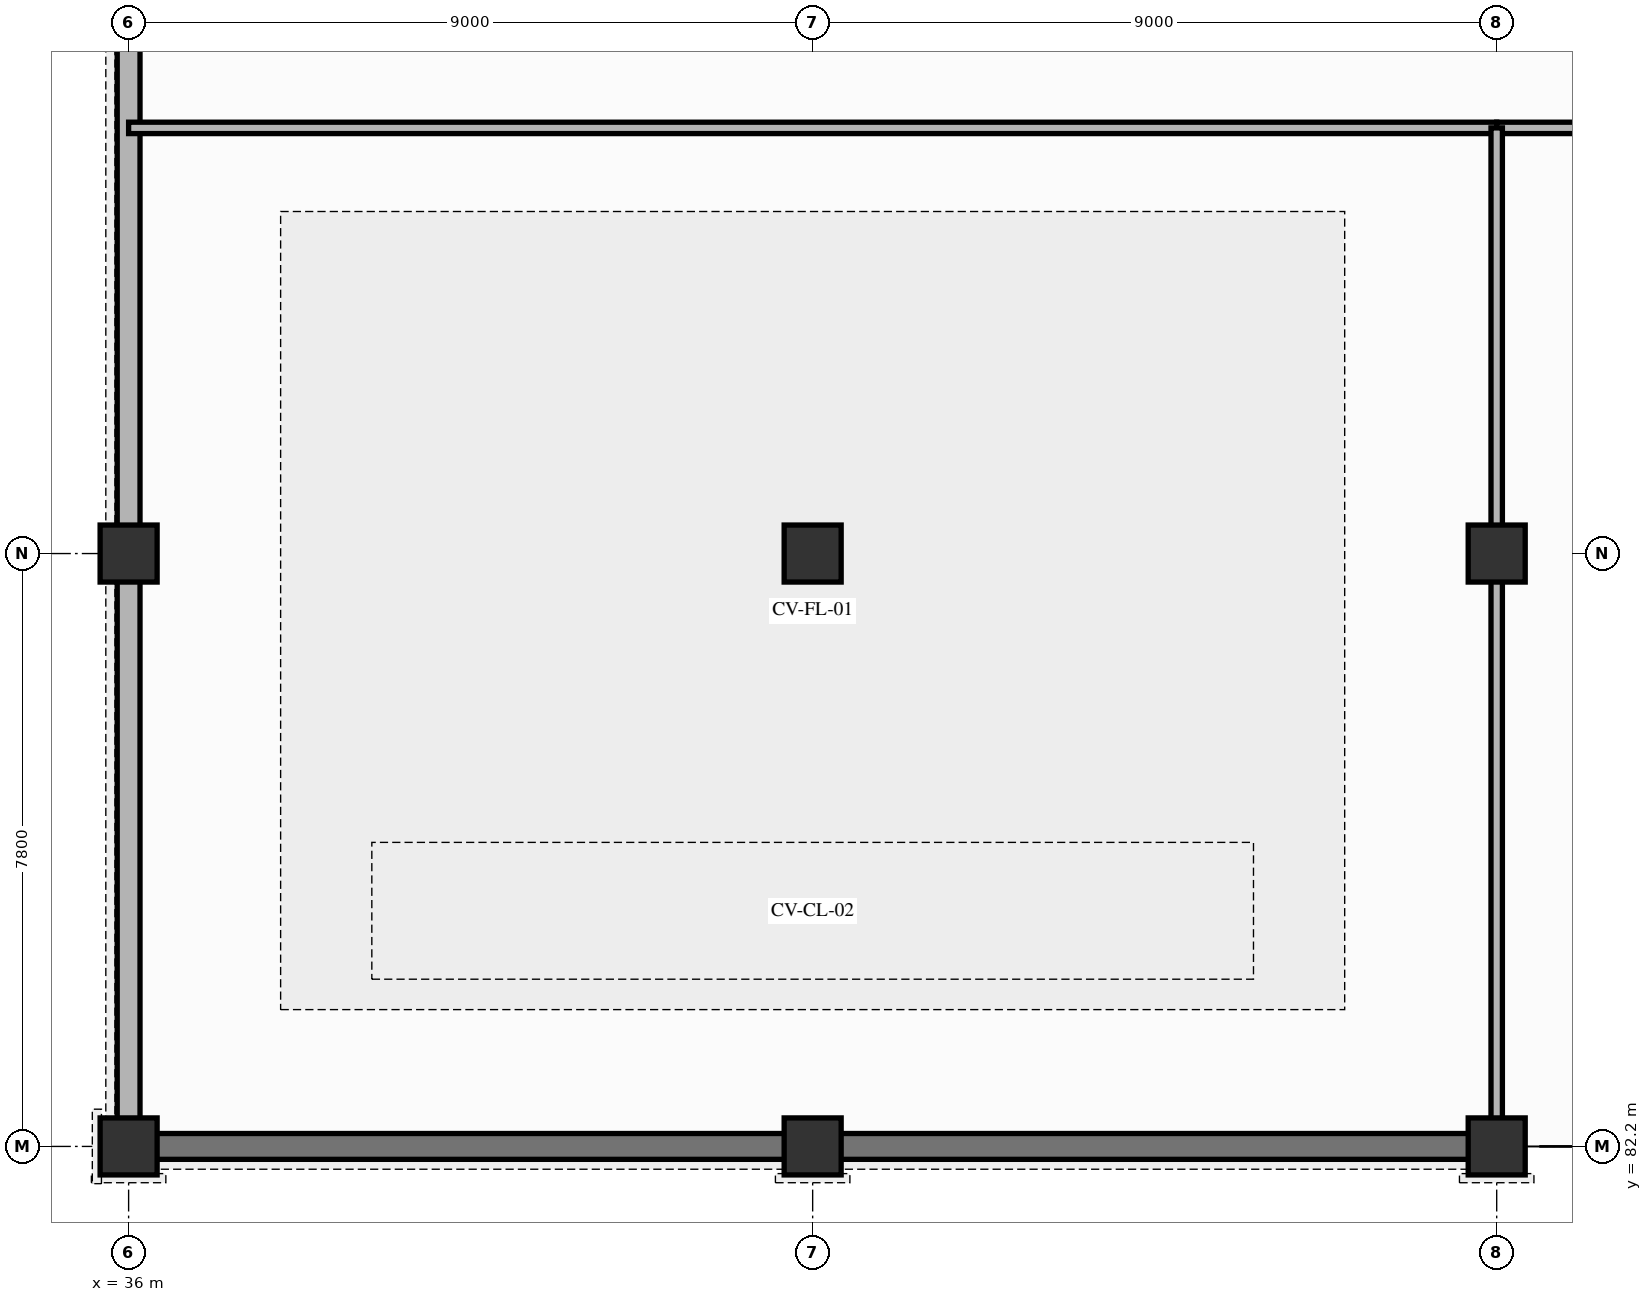
"""IFC4 building model, lengths in metres.
Left out: names, types, materials, properties, quantities, classifications, styles, units other than length and angle.
Written with IfcOpenShell. Run it as: python <this file> out.ifc"""

import sys

from ifc_helpers import new_model, si_unit, direction, frame, frame_2d, origin, origin_2d, place, context, subcontext, project, spatial, rectangle, extrude, element, fill, save


model = new_model("IFC4")
c1 = context("Model", 3, precision=1e-05, world=origin(), true_north=direction((0.0, 1.0)))
c2 = subcontext(c1, "Body", "Model", "MODEL_VIEW")
j1 = project(units=[si_unit("LENGTHUNIT", "METRE"), si_unit("PLANEANGLEUNIT", "RADIAN")], contexts=[c1])
p1 = place(None, origin())
s1 = spatial("IfcSite", under=j1, at=p1, CompositionType="ELEMENT")
p2 = place(p1, origin())
s2 = spatial("IfcBuilding", under=s1, at=p2, CompositionType="ELEMENT")
p3 = place(p2, frame((0.0, 0.0, 8.94)))
s3 = spatial("IfcBuildingStorey", under=s2, at=p3, CompositionType="ELEMENT", Elevation=8.94)
for number, where, z_axis, x_axis in (
    (1, (36.0, 82.2, 0.0), (0.0, 0.0, 1.0), (1.0, 0.0, 0.0)),
    (2, (36.0, 90.0, 0.0), (0.0, 0.0, 1.0), (1.0, 0.0, 0.0)),
    (3, (45.0, 82.2, 0.0), (0.0, 0.0, 1.0), (1.0, 0.0, 0.0)),
    (4, (45.0, 90.0, 0.0), (0.0, 0.0, 1.0), (1.0, 0.0, 0.0)),
    (5, (54.0, 82.2, 0.0), (0.0, 0.0, 1.0), (1.0, 0.0, 0.0)),
    (6, (54.0, 90.0, 0.0), (0.0, 0.0, 1.0), (1.0, 0.0, 0.0)),
):
    element("IfcColumn", number, at=place(p3, frame(where, z_axis=z_axis, x_axis=x_axis)), inside=s3, PredefinedType="COLUMN", context=c2, shape_type="SweptSolid", body=[
        extrude(rectangle(XDim=0.75, YDim=0.75, at=origin_2d()), origin(), (0.0, 0.0, 1.0), 3.84),
    ])
p4 = place(p3, frame((36.0, 82.2, 0.0), z_axis=(0.0, 0.0, 1.0), x_axis=(1.0, 0.0, 0.0)))
e7 = element("IfcWall", 7, at=p4, inside=s3, PredefinedType="SOLIDWALL", context=c2, shape_type="SweptSolid", body=[
    extrude(rectangle(XDim=9.0, YDim=0.34, at=frame_2d((4.5, 0.0))), origin(), (0.0, 0.0, 1.0), 3.53),
])
p5 = place(p4, frame((1.8, 0.0, 0.665)))
e8 = element("IfcOpeningElement", 8, at=p5, cuts=e7, PredefinedType="OPENING", context=c2, shape_type="SweptSolid", body=[
    extrude(rectangle(XDim=1.5, YDim=2.1, at=frame_2d((0.75, 1.05))), frame((0.0, 0.18, 0.0), z_axis=(0.0, -1.0, 0.0), x_axis=(1.0, 0.0, 0.0)), (0.0, 0.0, 1.0), 0.36),
])
p6 = place(p4, frame((5.4, 0.0, 0.665)))
e9 = element("IfcOpeningElement", 9, at=p6, cuts=e7, PredefinedType="OPENING", context=c2, shape_type="SweptSolid", body=[
    extrude(rectangle(XDim=1.2, YDim=2.1, at=frame_2d((0.6, 1.05))), frame((0.0, 0.18, 0.0), z_axis=(0.0, -1.0, 0.0), x_axis=(1.0, 0.0, 0.0)), (0.0, 0.0, 1.0), 0.36),
])
p7 = place(p3, frame((45.0, 82.2, 0.0), z_axis=(0.0, 0.0, 1.0), x_axis=(1.0, 0.0, 0.0)))
e10 = element("IfcWall", 10, at=p7, inside=s3, PredefinedType="SOLIDWALL", context=c2, shape_type="SweptSolid", body=[
    extrude(rectangle(XDim=9.0, YDim=0.34, at=frame_2d((4.5, 0.0))), origin(), (0.0, 0.0, 1.0), 3.53),
])
p8 = place(p7, frame((1.8, 0.0, 0.665)))
e11 = element("IfcOpeningElement", 11, at=p8, cuts=e10, PredefinedType="OPENING", context=c2, shape_type="SweptSolid", body=[
    extrude(rectangle(XDim=1.5, YDim=2.1, at=frame_2d((0.75, 1.05))), frame((0.0, 0.18, 0.0), z_axis=(0.0, -1.0, 0.0), x_axis=(1.0, 0.0, 0.0)), (0.0, 0.0, 1.0), 0.36),
])
p9 = place(p7, frame((5.4, 0.0, 0.665)))
e12 = element("IfcOpeningElement", 12, at=p9, cuts=e10, PredefinedType="OPENING", context=c2, shape_type="SweptSolid", body=[
    extrude(rectangle(XDim=1.2, YDim=2.1, at=frame_2d((0.6, 1.05))), frame((0.0, 0.18, 0.0), z_axis=(0.0, -1.0, 0.0), x_axis=(1.0, 0.0, 0.0)), (0.0, 0.0, 1.0), 0.36),
])
p10 = place(p3, frame((36.0, 82.2, 0.0), z_axis=(0.0, 0.0, 1.0), x_axis=(0.0, 1.0, 0.0)))
e13 = element("IfcWall", 13, at=p10, inside=s3, PredefinedType="SOLIDWALL", context=c2, shape_type="SweptSolid", body=[
    extrude(rectangle(XDim=31.8, YDim=0.3, at=frame_2d((15.9, 0.0))), origin(), (0.0, 0.0, 1.0), 2.805),
])
p11 = place(p10, frame((3.0, 0.0, 0.835)))
e14 = element("IfcOpeningElement", 14, at=p11, cuts=e13, PredefinedType="OPENING", context=c2, shape_type="SweptSolid", body=[
    extrude(rectangle(XDim=1.35, YDim=1.85, at=frame_2d((0.675, 0.925))), frame((0.0, 0.16, 0.0), z_axis=(0.0, -1.0, 0.0), x_axis=(1.0, 0.0, 0.0)), (0.0, 0.0, 1.0), 0.32),
])
p12 = place(p10, frame((9.5, 0.0, 0.935)))
e15 = element("IfcOpeningElement", 15, at=p12, cuts=e13, PredefinedType="OPENING", context=c2, shape_type="SweptSolid", body=[
    extrude(rectangle(XDim=1.05, YDim=1.75, at=frame_2d((0.525, 0.875))), frame((0.0, 0.16, 0.0), z_axis=(0.0, -1.0, 0.0), x_axis=(1.0, 0.0, 0.0)), (0.0, 0.0, 1.0), 0.32),
])
p13 = place(p10, frame((16.5, 0.0, 0.585)))
e16 = element("IfcOpeningElement", 16, at=p13, cuts=e13, PredefinedType="OPENING", context=c2, shape_type="SweptSolid", body=[
    extrude(rectangle(XDim=1.5, YDim=2.1, at=frame_2d((0.75, 1.05))), frame((0.0, 0.16, 0.0), z_axis=(0.0, -1.0, 0.0), x_axis=(1.0, 0.0, 0.0)), (0.0, 0.0, 1.0), 0.32),
])
p14 = place(p3, frame((36.0, 95.6, 0.0), z_axis=(0.0, 0.0, 1.0), x_axis=(1.0, 0.0, 0.0)))
e17 = element("IfcWall", 17, at=p14, inside=s3, PredefinedType="PARTITIONING", context=c2, shape_type="SweptSolid", body=[
    extrude(rectangle(XDim=18.0, YDim=0.15, at=frame_2d((9.0, 0.0))), origin(), (0.0, 0.0, 1.0), 2.705),
])
p15 = place(p14, frame((8.5, 0.0, 0.0)))
e18 = element("IfcOpeningElement", 18, at=p15, cuts=e17, PredefinedType="OPENING", context=c2, shape_type="SweptSolid", body=[
    extrude(rectangle(XDim=1.6, YDim=2.2, at=frame_2d((0.8, 1.1))), frame((0.0, 0.085, 0.0), z_axis=(0.0, -1.0, 0.0), x_axis=(1.0, 0.0, 0.0)), (0.0, 0.0, 1.0), 0.17),
])
p16 = place(p3, frame((54.0, 95.6, 0.0), z_axis=(0.0, 0.0, 1.0), x_axis=(1.0, 0.0, 0.0)))
e19 = element("IfcWall", 19, at=p16, inside=s3, PredefinedType="PARTITIONING", context=c2, shape_type="SweptSolid", body=[
    extrude(rectangle(XDim=18.0, YDim=0.15, at=frame_2d((9.0, 0.0))), origin(), (0.0, 0.0, 1.0), 2.705),
])
p17 = place(p16, frame((8.5, 0.0, 0.0)))
e20 = element("IfcOpeningElement", 20, at=p17, cuts=e19, PredefinedType="OPENING", context=c2, shape_type="SweptSolid", body=[
    extrude(rectangle(XDim=1.6, YDim=2.2, at=frame_2d((0.8, 1.1))), frame((0.0, 0.085, 0.0), z_axis=(0.0, -1.0, 0.0), x_axis=(1.0, 0.0, 0.0)), (0.0, 0.0, 1.0), 0.17),
])
p18 = place(p3, frame((54.0, 82.2, 0.0), z_axis=(0.0, 0.0, 1.0), x_axis=(0.0, 1.0, 0.0)))
e21 = element("IfcWall", 21, at=p18, inside=s3, PredefinedType="PARTITIONING", context=c2, shape_type="SweptSolid", body=[
    extrude(rectangle(XDim=13.4, YDim=0.15, at=frame_2d((6.7, 0.0))), origin(), (0.0, 0.0, 1.0), 2.705),
])
p19 = place(p5, origin())
e22 = element("IfcWindow", 22, at=p19, inside=s3, PartitioningType="SINGLE_PANEL", PredefinedType="WINDOW", context=c2, shape_type="SweptSolid", body=[
    extrude(rectangle(XDim=1.5, YDim=2.1, at=frame_2d((0.75, 1.05))), frame((0.0, 0.03, 0.0), z_axis=(0.0, -1.0, 0.0), x_axis=(1.0, 0.0, 0.0)), (0.0, 0.0, 1.0), 0.06),
])
fill(e8, e22)
p20 = place(p6, origin())
e23 = element("IfcWindow", 23, at=p20, inside=s3, PartitioningType="SINGLE_PANEL", PredefinedType="WINDOW", context=c2, shape_type="SweptSolid", body=[
    extrude(rectangle(XDim=1.2, YDim=2.1, at=frame_2d((0.6, 1.05))), frame((0.0, 0.03, 0.0), z_axis=(0.0, -1.0, 0.0), x_axis=(1.0, 0.0, 0.0)), (0.0, 0.0, 1.0), 0.06),
])
fill(e9, e23)
p21 = place(p8, origin())
e24 = element("IfcWindow", 24, at=p21, inside=s3, PartitioningType="SINGLE_PANEL", PredefinedType="WINDOW", context=c2, shape_type="SweptSolid", body=[
    extrude(rectangle(XDim=1.5, YDim=2.1, at=frame_2d((0.75, 1.05))), frame((0.0, 0.03, 0.0), z_axis=(0.0, -1.0, 0.0), x_axis=(1.0, 0.0, 0.0)), (0.0, 0.0, 1.0), 0.06),
])
fill(e11, e24)
p22 = place(p9, origin())
e25 = element("IfcWindow", 25, at=p22, inside=s3, PartitioningType="SINGLE_PANEL", PredefinedType="WINDOW", context=c2, shape_type="SweptSolid", body=[
    extrude(rectangle(XDim=1.2, YDim=2.1, at=frame_2d((0.6, 1.05))), frame((0.0, 0.03, 0.0), z_axis=(0.0, -1.0, 0.0), x_axis=(1.0, 0.0, 0.0)), (0.0, 0.0, 1.0), 0.06),
])
fill(e12, e25)
p23 = place(p11, origin())
e26 = element("IfcWindow", 26, at=p23, inside=s3, PartitioningType="SINGLE_PANEL", PredefinedType="WINDOW", context=c2, shape_type="SweptSolid", body=[
    extrude(rectangle(XDim=1.35, YDim=1.85, at=frame_2d((0.675, 0.925))), frame((0.0, 0.03, 0.0), z_axis=(0.0, -1.0, 0.0), x_axis=(1.0, 0.0, 0.0)), (0.0, 0.0, 1.0), 0.06),
])
fill(e14, e26)
p24 = place(p12, origin())
e27 = element("IfcWindow", 27, at=p24, inside=s3, PartitioningType="SINGLE_PANEL", PredefinedType="WINDOW", context=c2, shape_type="SweptSolid", body=[
    extrude(rectangle(XDim=1.05, YDim=1.75, at=frame_2d((0.525, 0.875))), frame((0.0, 0.03, 0.0), z_axis=(0.0, -1.0, 0.0), x_axis=(1.0, 0.0, 0.0)), (0.0, 0.0, 1.0), 0.06),
])
fill(e15, e27)
p25 = place(p15, origin())
e28 = element("IfcDoor", 28, at=p25, inside=s3, OperationType="DOUBLE_DOOR_SINGLE_SWING", PredefinedType="DOOR", context=c2, shape_type="SweptSolid", body=[
    extrude(rectangle(XDim=1.6, YDim=2.2, at=frame_2d((0.8, 1.1))), frame((0.0, 0.025, 0.0), z_axis=(0.0, -1.0, 0.0), x_axis=(1.0, 0.0, 0.0)), (0.0, 0.0, 1.0), 0.05),
])
fill(e18, e28)
save(model, sys.argv[1])
